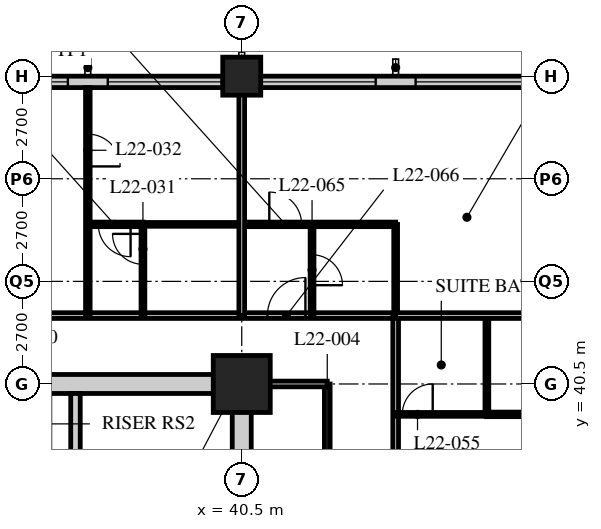
"""IFC4 building model, lengths in metres.
Left out: names, types, materials, properties, quantities, classifications, styles, units other than length and angle.
Written with IfcOpenShell. Run it as: python <this file> out.ifc"""

import sys

from ifc_helpers import new_model, si_unit, direction, frame, frame_2d, origin, origin_2d, place, context, subcontext, project, spatial, rectangle, hollow_rectangle, extrude, element, fill, save


model = new_model("IFC4")
c1 = context("Model", 3, precision=1e-05, world=origin(), true_north=direction((0.0, 1.0)))
c2 = subcontext(c1, "Body", "Model", "MODEL_VIEW")
j1 = project(units=[si_unit("LENGTHUNIT", "METRE"), si_unit("PLANEANGLEUNIT", "RADIAN")], contexts=[c1])
p1 = place(None, origin())
s1 = spatial("IfcSite", under=j1, at=p1, CompositionType="ELEMENT")
p2 = place(p1, origin())
s2 = spatial("IfcBuilding", under=s1, at=p2, CompositionType="ELEMENT")
p3 = place(p2, frame((0.0, 0.0, 87.4)))
s3 = spatial("IfcBuildingStorey", under=s2, at=p3, CompositionType="ELEMENT", Elevation=87.4)
p4 = place(p3, frame((40.5, 40.5, 0.0), z_axis=(0.0, 0.0, 1.0), x_axis=(1.0, 0.0, 0.0)))
e1 = element("IfcColumn", 1, at=p4, inside=s3, PredefinedType="COLUMN", context=c2, shape_type="SweptSolid", body=[
    extrude(hollow_rectangle(XDim=1.5, YDim=1.5, WallThickness=0.13, at=origin_2d()), origin(), (0.0, 0.0, 1.0), 3.4),
])
p5 = place(p3, frame((40.5, 48.6, 0.0), z_axis=(0.0, 0.0, 1.0), x_axis=(1.0, 0.0, 0.0)))
e2 = element("IfcColumn", 2, at=p5, inside=s3, PredefinedType="COLUMN", context=c2, shape_type="SweptSolid", body=[
    extrude(hollow_rectangle(XDim=1.0, YDim=1.0, WallThickness=0.1, at=origin_2d()), origin(), (0.0, 0.0, 1.0), 3.4),
])
p6 = place(p3, frame((48.3, 48.45, 0.0), z_axis=(0.0, 0.0, 1.0), x_axis=(-1.0, 0.0, 0.0)))
e3 = element("IfcWall", 3, at=p6, inside=s3, PredefinedType="SOLIDWALL", context=c2, shape_type="SweptSolid", body=[
    extrude(rectangle(XDim=40.2, YDim=0.3, at=frame_2d((20.1, 0.0))), origin(), (0.0, 0.0, 1.0), 2.05),
])
p7 = place(p6, frame((0.225, 0.0, 0.9)))
e4 = element("IfcOpeningElement", 4, at=p7, cuts=e3, PredefinedType="OPENING", context=c2, shape_type="SweptSolid", body=[
    extrude(rectangle(XDim=3.0, YDim=1.1, at=frame_2d((1.5, 0.55))), frame((0.0, 0.16, 0.0), z_axis=(0.0, -1.0, 0.0), x_axis=(1.0, 0.0, 0.0)), (0.0, 0.0, 1.0), 0.32),
])
p8 = place(p6, frame((4.275, 0.0, 0.9)))
e5 = element("IfcOpeningElement", 5, at=p8, cuts=e3, PredefinedType="OPENING", context=c2, shape_type="SweptSolid", body=[
    extrude(rectangle(XDim=3.0, YDim=1.1, at=frame_2d((1.5, 0.55))), frame((0.0, 0.16, 0.0), z_axis=(0.0, -1.0, 0.0), x_axis=(1.0, 0.0, 0.0)), (0.0, 0.0, 1.0), 0.32),
])
p9 = place(p6, frame((8.325, 0.0, 0.9)))
e6 = element("IfcOpeningElement", 6, at=p9, cuts=e3, PredefinedType="OPENING", context=c2, shape_type="SweptSolid", body=[
    extrude(rectangle(XDim=3.0, YDim=1.1, at=frame_2d((1.5, 0.55))), frame((0.0, 0.16, 0.0), z_axis=(0.0, -1.0, 0.0), x_axis=(1.0, 0.0, 0.0)), (0.0, 0.0, 1.0), 0.32),
])
p10 = place(p6, frame((12.375, 0.0, 0.9)))
e7 = element("IfcOpeningElement", 7, at=p10, cuts=e3, PredefinedType="OPENING", context=c2, shape_type="SweptSolid", body=[
    extrude(rectangle(XDim=3.0, YDim=1.1, at=frame_2d((1.5, 0.55))), frame((0.0, 0.16, 0.0), z_axis=(0.0, -1.0, 0.0), x_axis=(1.0, 0.0, 0.0)), (0.0, 0.0, 1.0), 0.32),
])
p11 = place(p6, frame((16.425, 0.0, 0.9)))
e8 = element("IfcOpeningElement", 8, at=p11, cuts=e3, PredefinedType="OPENING", context=c2, shape_type="SweptSolid", body=[
    extrude(rectangle(XDim=3.0, YDim=1.1, at=frame_2d((1.5, 0.55))), frame((0.0, 0.16, 0.0), z_axis=(0.0, -1.0, 0.0), x_axis=(1.0, 0.0, 0.0)), (0.0, 0.0, 1.0), 0.32),
])
p12 = place(p6, frame((20.475, 0.0, 0.9)))
e9 = element("IfcOpeningElement", 9, at=p12, cuts=e3, PredefinedType="OPENING", context=c2, shape_type="SweptSolid", body=[
    extrude(rectangle(XDim=3.0, YDim=1.1, at=frame_2d((1.5, 0.55))), frame((0.0, 0.16, 0.0), z_axis=(0.0, -1.0, 0.0), x_axis=(1.0, 0.0, 0.0)), (0.0, 0.0, 1.0), 0.32),
])
p13 = place(p6, frame((24.525, 0.0, 0.9)))
e10 = element("IfcOpeningElement", 10, at=p13, cuts=e3, PredefinedType="OPENING", context=c2, shape_type="SweptSolid", body=[
    extrude(rectangle(XDim=3.0, YDim=1.1, at=frame_2d((1.5, 0.55))), frame((0.0, 0.16, 0.0), z_axis=(0.0, -1.0, 0.0), x_axis=(1.0, 0.0, 0.0)), (0.0, 0.0, 1.0), 0.32),
])
p14 = place(p6, frame((28.575, 0.0, 0.9)))
e11 = element("IfcOpeningElement", 11, at=p14, cuts=e3, PredefinedType="OPENING", context=c2, shape_type="SweptSolid", body=[
    extrude(rectangle(XDim=3.0, YDim=1.1, at=frame_2d((1.5, 0.55))), frame((0.0, 0.16, 0.0), z_axis=(0.0, -1.0, 0.0), x_axis=(1.0, 0.0, 0.0)), (0.0, 0.0, 1.0), 0.32),
])
p15 = place(p6, frame((32.625, 0.0, 0.9)))
e12 = element("IfcOpeningElement", 12, at=p15, cuts=e3, PredefinedType="OPENING", context=c2, shape_type="SweptSolid", body=[
    extrude(rectangle(XDim=3.0, YDim=1.1, at=frame_2d((1.5, 0.55))), frame((0.0, 0.16, 0.0), z_axis=(0.0, -1.0, 0.0), x_axis=(1.0, 0.0, 0.0)), (0.0, 0.0, 1.0), 0.32),
])
p16 = place(p6, frame((36.675, 0.0, 0.9)))
e13 = element("IfcOpeningElement", 13, at=p16, cuts=e3, PredefinedType="OPENING", context=c2, shape_type="SweptSolid", body=[
    extrude(rectangle(XDim=3.0, YDim=1.1, at=frame_2d((1.5, 0.55))), frame((0.0, 0.16, 0.0), z_axis=(0.0, -1.0, 0.0), x_axis=(1.0, 0.0, 0.0)), (0.0, 0.0, 1.0), 0.32),
])
p17 = place(p3, frame((12.15, 42.3, 0.0), z_axis=(0.0, 0.0, 1.0), x_axis=(1.0, 0.0, 0.0)))
e14 = element("IfcWall", 14, at=p17, inside=s3, PredefinedType="PARTITIONING", context=c2, shape_type="SweptSolid", body=[
    extrude(rectangle(XDim=32.4, YDim=0.15, at=frame_2d((16.2, 0.0))), origin(), (0.0, 0.0, 1.0), 3.15),
])
p18 = place(p17, frame((5.95, 0.0, 0.0)))
e15 = element("IfcOpeningElement", 15, at=p18, cuts=e14, PredefinedType="OPENING", context=c2, shape_type="SweptSolid", body=[
    extrude(rectangle(XDim=1.0, YDim=2.1, at=frame_2d((0.5, 1.05))), frame((0.0, 0.085, 0.0), z_axis=(0.0, -1.0, 0.0), x_axis=(1.0, 0.0, 0.0)), (0.0, 0.0, 1.0), 0.17),
])
p19 = place(p17, frame((14.6, 0.0, 0.0)))
e16 = element("IfcOpeningElement", 16, at=p19, cuts=e14, PredefinedType="OPENING", context=c2, shape_type="SweptSolid", body=[
    extrude(rectangle(XDim=1.0, YDim=2.1, at=frame_2d((0.5, 1.05))), frame((0.0, 0.085, 0.0), z_axis=(0.0, -1.0, 0.0), x_axis=(1.0, 0.0, 0.0)), (0.0, 0.0, 1.0), 0.17),
])
p20 = place(p17, frame((18.65, 0.0, 0.0)))
e17 = element("IfcOpeningElement", 17, at=p20, cuts=e14, PredefinedType="OPENING", context=c2, shape_type="SweptSolid", body=[
    extrude(rectangle(XDim=1.0, YDim=2.1, at=frame_2d((0.5, 1.05))), frame((0.0, 0.085, 0.0), z_axis=(0.0, -1.0, 0.0), x_axis=(1.0, 0.0, 0.0)), (0.0, 0.0, 1.0), 0.17),
])
p21 = place(p17, frame((22.15, 0.0, 0.0)))
e18 = element("IfcOpeningElement", 18, at=p21, cuts=e14, PredefinedType="OPENING", context=c2, shape_type="SweptSolid", body=[
    extrude(rectangle(XDim=1.0, YDim=2.1, at=frame_2d((0.5, 1.05))), frame((0.0, 0.085, 0.0), z_axis=(0.0, -1.0, 0.0), x_axis=(1.0, 0.0, 0.0)), (0.0, 0.0, 1.0), 0.17),
])
p22 = place(p17, frame((29.025, 0.0, 0.0)))
e19 = element("IfcOpeningElement", 19, at=p22, cuts=e14, PredefinedType="OPENING", context=c2, shape_type="SweptSolid", body=[
    extrude(rectangle(XDim=1.0, YDim=2.1, at=frame_2d((0.5, 1.05))), frame((0.0, 0.085, 0.0), z_axis=(0.0, -1.0, 0.0), x_axis=(1.0, 0.0, 0.0)), (0.0, 0.0, 1.0), 0.17),
])
p23 = place(p17, frame((2.375, 0.0, 0.0)))
e20 = element("IfcOpeningElement", 20, at=p23, cuts=e14, PredefinedType="OPENING", context=c2, shape_type="SweptSolid", body=[
    extrude(rectangle(XDim=1.0, YDim=2.1, at=frame_2d((0.5, 1.05))), frame((0.0, 0.085, 0.0), z_axis=(0.0, -1.0, 0.0), x_axis=(1.0, 0.0, 0.0)), (0.0, 0.0, 1.0), 0.17),
])
p24 = place(p3, frame((44.55, 16.2, 0.0), z_axis=(0.0, 0.0, 1.0), x_axis=(0.0, 1.0, 0.0)))
e21 = element("IfcWall", 21, at=p24, inside=s3, PredefinedType="PARTITIONING", context=c2, shape_type="SweptSolid", body=[
    extrude(rectangle(XDim=26.1, YDim=0.15, at=frame_2d((13.05, 0.0))), origin(), (0.0, 0.0, 1.0), 3.15),
])
p25 = place(p24, frame((2.75, 0.0, 0.0)))
e22 = element("IfcOpeningElement", 22, at=p25, cuts=e21, PredefinedType="OPENING", context=c2, shape_type="SweptSolid", body=[
    extrude(rectangle(XDim=1.0, YDim=2.1, at=frame_2d((0.5, 1.05))), frame((0.0, 0.085, 0.0), z_axis=(0.0, -1.0, 0.0), x_axis=(1.0, 0.0, 0.0)), (0.0, 0.0, 1.0), 0.17),
])
p26 = place(p24, frame((6.5, 0.0, 0.0)))
e23 = element("IfcOpeningElement", 23, at=p26, cuts=e21, PredefinedType="OPENING", context=c2, shape_type="SweptSolid", body=[
    extrude(rectangle(XDim=1.0, YDim=2.1, at=frame_2d((0.5, 1.05))), frame((0.0, 0.085, 0.0), z_axis=(0.0, -1.0, 0.0), x_axis=(1.0, 0.0, 0.0)), (0.0, 0.0, 1.0), 0.17),
])
p27 = place(p24, frame((10.0, 0.0, 0.0)))
e24 = element("IfcOpeningElement", 24, at=p27, cuts=e21, PredefinedType="OPENING", context=c2, shape_type="SweptSolid", body=[
    extrude(rectangle(XDim=1.0, YDim=2.1, at=frame_2d((0.5, 1.05))), frame((0.0, 0.085, 0.0), z_axis=(0.0, -1.0, 0.0), x_axis=(1.0, 0.0, 0.0)), (0.0, 0.0, 1.0), 0.17),
])
p28 = place(p24, frame((18.1, 0.0, 0.0)))
e25 = element("IfcOpeningElement", 25, at=p28, cuts=e21, PredefinedType="OPENING", context=c2, shape_type="SweptSolid", body=[
    extrude(rectangle(XDim=1.0, YDim=2.1, at=frame_2d((0.5, 1.05))), frame((0.0, 0.085, 0.0), z_axis=(0.0, -1.0, 0.0), x_axis=(1.0, 0.0, 0.0)), (0.0, 0.0, 1.0), 0.17),
])
p29 = place(p3, frame((42.75, 18.0, 0.0), z_axis=(0.0, 0.0, 1.0), x_axis=(0.0, 1.0, 0.0)))
e26 = element("IfcWall", 26, at=p29, inside=s3, PredefinedType="PARTITIONING", context=c2, shape_type="SweptSolid", body=[
    extrude(rectangle(XDim=22.5, YDim=0.15, at=frame_2d((11.25, 0.0))), origin(), (0.0, 0.0, 1.0), 3.15),
])
p30 = place(p29, frame((9.85, 0.0, 0.0)))
e27 = element("IfcOpeningElement", 27, at=p30, cuts=e26, PredefinedType="OPENING", context=c2, shape_type="SweptSolid", body=[
    extrude(rectangle(XDim=1.0, YDim=2.1, at=frame_2d((0.5, 1.05))), frame((0.0, 0.085, 0.0), z_axis=(0.0, -1.0, 0.0), x_axis=(1.0, 0.0, 0.0)), (0.0, 0.0, 1.0), 0.17),
])
p31 = place(p29, frame((17.95, 0.0, 0.0)))
e28 = element("IfcOpeningElement", 28, at=p31, cuts=e26, PredefinedType="OPENING", context=c2, shape_type="SweptSolid", body=[
    extrude(rectangle(XDim=1.0, YDim=2.1, at=frame_2d((0.5, 1.05))), frame((0.0, 0.085, 0.0), z_axis=(0.0, -1.0, 0.0), x_axis=(1.0, 0.0, 0.0)), (0.0, 0.0, 1.0), 0.17),
])
p32 = place(p3, frame((42.75, 40.5, 0.0), z_axis=(0.0, 0.0, 1.0), x_axis=(-1.0, 0.0, 0.0)))
e29 = element("IfcWall", 29, at=p32, inside=s3, PredefinedType="PARTITIONING", context=c2, shape_type="SweptSolid", body=[
    extrude(rectangle(XDim=2.05, YDim=0.15, at=frame_2d((1.025, 0.0))), origin(), (0.0, 0.0, 1.0), 2.05),
])
p33 = place(p3, frame((37.9, 44.7, 0.0), z_axis=(0.0, 0.0, 1.0), x_axis=(1.0, 0.0, 0.0)))
e30 = element("IfcWall", 30, at=p33, inside=s3, PredefinedType="PARTITIONING", context=c2, shape_type="SweptSolid", body=[
    extrude(rectangle(XDim=2.6, YDim=0.1, at=frame_2d((1.3, 0.0))), origin(), (0.0, 0.0, 1.0), 3.15),
])
p34 = place(p3, frame((37.9, 42.3, 0.0), z_axis=(0.0, 0.0, 1.0), x_axis=(0.0, 1.0, 0.0)))
e31 = element("IfcWall", 31, at=p34, inside=s3, PredefinedType="PARTITIONING", context=c2, shape_type="SweptSolid", body=[
    extrude(rectangle(XDim=2.4, YDim=0.1, at=frame_2d((1.2, 0.0))), origin(), (0.0, 0.0, 1.0), 3.15),
])
p35 = place(p34, frame((1.35, 0.0, 0.0)))
e32 = element("IfcOpeningElement", 32, at=p35, cuts=e31, PredefinedType="OPENING", context=c2, shape_type="SweptSolid", body=[
    extrude(rectangle(XDim=0.8, YDim=2.1, at=frame_2d((0.4, 1.05))), frame((0.0, 0.06, 0.0), z_axis=(0.0, -1.0, 0.0), x_axis=(1.0, 0.0, 0.0)), (0.0, 0.0, 1.0), 0.12),
])
p36 = place(p3, frame((36.45, 42.3, 0.0), z_axis=(0.0, 0.0, 1.0), x_axis=(0.0, 1.0, 0.0)))
e33 = element("IfcWall", 33, at=p36, inside=s3, PredefinedType="PARTITIONING", context=c2, shape_type="SweptSolid", body=[
    extrude(rectangle(XDim=6.0, YDim=0.12, at=frame_2d((3.0, 0.0))), origin(), (0.0, 0.0, 1.0), 3.15),
])
p37 = place(p36, frame((3.925, 0.0, 0.0)))
e34 = element("IfcOpeningElement", 34, at=p37, cuts=e33, PredefinedType="OPENING", context=c2, shape_type="SweptSolid", body=[
    extrude(rectangle(XDim=0.85, YDim=2.1, at=frame_2d((0.425, 1.05))), frame((0.0, 0.07, 0.0), z_axis=(0.0, -1.0, 0.0), x_axis=(1.0, 0.0, 0.0)), (0.0, 0.0, 1.0), 0.14),
])
p38 = place(p3, frame((46.95, 39.7, 0.0), z_axis=(0.0, 0.0, 1.0), x_axis=(0.0, 1.0, 0.0)))
e35 = element("IfcWall", 35, at=p38, inside=s3, PredefinedType="PARTITIONING", context=c2, shape_type="SweptSolid", body=[
    extrude(rectangle(XDim=2.6, YDim=0.1, at=frame_2d((1.3, 0.0))), origin(), (0.0, 0.0, 1.0), 3.15),
])
p39 = place(p3, frame((44.55, 39.7, 0.0), z_axis=(0.0, 0.0, 1.0), x_axis=(1.0, 0.0, 0.0)))
e36 = element("IfcWall", 36, at=p39, inside=s3, PredefinedType="PARTITIONING", context=c2, shape_type="SweptSolid", body=[
    extrude(rectangle(XDim=2.4, YDim=0.1, at=frame_2d((1.2, 0.0))), origin(), (0.0, 0.0, 1.0), 3.15),
])
p40 = place(p39, frame((0.175, 0.0, 0.0)))
e37 = element("IfcOpeningElement", 37, at=p40, cuts=e36, PredefinedType="OPENING", context=c2, shape_type="SweptSolid", body=[
    extrude(rectangle(XDim=0.8, YDim=2.1, at=frame_2d((0.4, 1.05))), frame((0.0, 0.06, 0.0), z_axis=(0.0, -1.0, 0.0), x_axis=(1.0, 0.0, 0.0)), (0.0, 0.0, 1.0), 0.12),
])
p41 = place(p3, frame((40.5, 44.7, 0.0), z_axis=(0.0, 0.0, 1.0), x_axis=(1.0, 0.0, 0.0)))
e38 = element("IfcWall", 38, at=p41, inside=s3, PredefinedType="PARTITIONING", context=c2, shape_type="SweptSolid", body=[
    extrude(rectangle(XDim=4.05, YDim=0.12, at=frame_2d((2.025, 0.0))), origin(), (0.0, 0.0, 1.0), 3.15),
])
p42 = place(p41, frame((0.725, 0.0, 0.0)))
e39 = element("IfcOpeningElement", 39, at=p42, cuts=e38, PredefinedType="OPENING", context=c2, shape_type="SweptSolid", body=[
    extrude(rectangle(XDim=0.85, YDim=2.1, at=frame_2d((0.425, 1.05))), frame((0.0, 0.07, 0.0), z_axis=(0.0, -1.0, 0.0), x_axis=(1.0, 0.0, 0.0)), (0.0, 0.0, 1.0), 0.14),
])
p43 = place(p3, frame((42.35, 42.3, 0.0), z_axis=(0.0, 0.0, 1.0), x_axis=(0.0, 1.0, 0.0)))
e40 = element("IfcWall", 40, at=p43, inside=s3, PredefinedType="PARTITIONING", context=c2, shape_type="SweptSolid", body=[
    extrude(rectangle(XDim=2.4, YDim=0.1, at=frame_2d((1.2, 0.0))), origin(), (0.0, 0.0, 1.0), 3.15),
])
p44 = place(p43, frame((0.8, 0.0, 0.0)))
e41 = element("IfcOpeningElement", 41, at=p44, cuts=e40, PredefinedType="OPENING", context=c2, shape_type="SweptSolid", body=[
    extrude(rectangle(XDim=0.8, YDim=2.1, at=frame_2d((0.4, 1.05))), frame((0.0, 0.06, 0.0), z_axis=(0.0, -1.0, 0.0), x_axis=(1.0, 0.0, 0.0)), (0.0, 0.0, 1.0), 0.12),
])
p45 = place(p3, frame((44.55, 42.3, 0.0), z_axis=(0.0, 0.0, 1.0), x_axis=(0.0, 1.0, 0.0)))
e42 = element("IfcWall", 42, at=p45, inside=s3, PredefinedType="PARTITIONING", context=c2, shape_type="SweptSolid", body=[
    extrude(rectangle(XDim=2.4, YDim=0.1, at=frame_2d((1.2, 0.0))), origin(), (0.0, 0.0, 1.0), 3.15),
])
p46 = place(p3, frame((44.55, 42.3, 0.0), z_axis=(0.0, 0.0, 1.0), x_axis=(1.0, 0.0, 0.0)))
e43 = element("IfcWall", 43, at=p46, inside=s3, PredefinedType="PARTITIONING", context=c2, shape_type="SweptSolid", body=[
    extrude(rectangle(XDim=7.8, YDim=0.15, at=frame_2d((3.9, 0.0))), origin(), (0.0, 0.0, 1.0), 3.15),
])
p47 = place(p3, frame((40.5, 42.3, 0.0), z_axis=(0.0, 0.0, 1.0), x_axis=(0.0, 1.0, 0.0)))
e44 = element("IfcWall", 44, at=p47, inside=s3, PredefinedType="PARTITIONING", context=c2, shape_type="SweptSolid", body=[
    extrude(rectangle(XDim=6.0, YDim=0.15, at=frame_2d((3.0, 0.0))), origin(), (0.0, 0.0, 1.0), 2.05),
])
p48 = place(p3, frame((36.45, 44.7, 0.0), z_axis=(0.0, 0.0, 1.0), x_axis=(1.0, 0.0, 0.0)))
e45 = element("IfcWall", 45, at=p48, inside=s3, PredefinedType="PARTITIONING", context=c2, shape_type="SweptSolid", body=[
    extrude(rectangle(XDim=1.46, YDim=0.12, at=frame_2d((0.73, 0.0))), origin(), (0.0, 0.0, 1.0), 3.15),
])
p49 = place(p48, frame((0.275, 0.0, 0.0)))
e46 = element("IfcOpeningElement", 46, at=p49, cuts=e45, PredefinedType="OPENING", context=c2, shape_type="SweptSolid", body=[
    extrude(rectangle(XDim=0.85, YDim=2.1, at=frame_2d((0.425, 1.05))), frame((0.0, 0.07, 0.0), z_axis=(0.0, -1.0, 0.0), x_axis=(1.0, 0.0, 0.0)), (0.0, 0.0, 1.0), 0.14),
])
p50 = place(p3, frame((56.4, 39.7, 0.0), z_axis=(0.0, 0.0, 1.0), x_axis=(-1.0, 0.0, 0.0)))
e47 = element("IfcWall", 47, at=p50, inside=s3, PredefinedType="PARTITIONING", context=c2, shape_type="SweptSolid", body=[
    extrude(rectangle(XDim=9.46, YDim=0.12, at=frame_2d((4.73, 0.0))), origin(), (0.0, 0.0, 1.0), 3.15),
])
p51 = place(p50, frame((6.085, 0.0, 0.0)))
e48 = element("IfcOpeningElement", 48, at=p51, cuts=e47, PredefinedType="OPENING", context=c2, shape_type="SweptSolid", body=[
    extrude(rectangle(XDim=0.85, YDim=2.0, at=frame_2d((0.425, 1.0))), frame((0.0, 0.07, 0.0), z_axis=(0.0, -1.0, 0.0), x_axis=(1.0, 0.0, 0.0)), (0.0, 0.0, 1.0), 0.14),
])
p52 = place(p3, frame((32.4, 40.5, 0.0), z_axis=(0.0, 0.0, 1.0), x_axis=(1.0, 0.0, 0.0)))
e49 = element("IfcWall", 49, at=p52, inside=s3, PredefinedType="SOLIDWALL", context=c2, shape_type="SweptSolid", body=[
    extrude(rectangle(XDim=8.35, YDim=0.5, at=frame_2d((4.175, 0.0))), origin(), (0.0, 0.0, 1.0), 2.388),
])
p53 = place(p3, frame((40.5, 24.55, 0.0), z_axis=(0.0, 0.0, 1.0), x_axis=(0.0, 1.0, 0.0)))
e50 = element("IfcWall", 50, at=p53, inside=s3, PredefinedType="SOLIDWALL", context=c2, shape_type="SweptSolid", body=[
    extrude(rectangle(XDim=15.7, YDim=0.5, at=frame_2d((7.85, 0.0))), origin(), (0.0, 0.0, 1.0), 2.05),
])
p54 = place(p3, frame((36.125, 32.5, 0.0), z_axis=(0.0, 0.0, 1.0), x_axis=(0.0, 1.0, 0.0)))
e51 = element("IfcWall", 51, at=p54, inside=s3, PredefinedType="SOLIDWALL", context=c2, shape_type="SweptSolid", body=[
    extrude(rectangle(XDim=7.75, YDim=0.25, at=frame_2d((3.875, 0.0))), origin(), (0.0, 0.0, 1.0), 3.15),
])
p55 = place(p54, frame((0.45, 0.0, 0.0)))
e52 = element("IfcOpeningElement", 52, at=p55, cuts=e51, PredefinedType="OPENING", context=c2, shape_type="SweptSolid", body=[
    extrude(rectangle(XDim=1.2, YDim=2.1, at=frame_2d((0.6, 1.05))), frame((0.0, 0.135, 0.0), z_axis=(0.0, -1.0, 0.0), x_axis=(1.0, 0.0, 0.0)), (0.0, 0.0, 1.0), 0.27),
])
p56 = place(p7, origin())
e53 = element("IfcWindow", 53, at=p56, inside=s3, PartitioningType="SINGLE_PANEL", PredefinedType="WINDOW", context=c2, shape_type="SweptSolid", body=[
    extrude(rectangle(XDim=3.0, YDim=1.1, at=frame_2d((1.5, 0.55))), frame((0.0, 0.03, 0.0), z_axis=(0.0, -1.0, 0.0), x_axis=(1.0, 0.0, 0.0)), (0.0, 0.0, 1.0), 0.06),
])
fill(e4, e53)
p57 = place(p8, origin())
e54 = element("IfcWindow", 54, at=p57, inside=s3, PartitioningType="SINGLE_PANEL", PredefinedType="WINDOW", context=c2, shape_type="SweptSolid", body=[
    extrude(rectangle(XDim=3.0, YDim=1.1, at=frame_2d((1.5, 0.55))), frame((0.0, 0.03, 0.0), z_axis=(0.0, -1.0, 0.0), x_axis=(1.0, 0.0, 0.0)), (0.0, 0.0, 1.0), 0.06),
])
fill(e5, e54)
p58 = place(p9, origin())
e55 = element("IfcWindow", 55, at=p58, inside=s3, PartitioningType="SINGLE_PANEL", PredefinedType="WINDOW", context=c2, shape_type="SweptSolid", body=[
    extrude(rectangle(XDim=3.0, YDim=1.1, at=frame_2d((1.5, 0.55))), frame((0.0, 0.03, 0.0), z_axis=(0.0, -1.0, 0.0), x_axis=(1.0, 0.0, 0.0)), (0.0, 0.0, 1.0), 0.06),
])
fill(e6, e55)
p59 = place(p10, origin())
e56 = element("IfcWindow", 56, at=p59, inside=s3, PartitioningType="SINGLE_PANEL", PredefinedType="WINDOW", context=c2, shape_type="SweptSolid", body=[
    extrude(rectangle(XDim=3.0, YDim=1.1, at=frame_2d((1.5, 0.55))), frame((0.0, 0.03, 0.0), z_axis=(0.0, -1.0, 0.0), x_axis=(1.0, 0.0, 0.0)), (0.0, 0.0, 1.0), 0.06),
])
fill(e7, e56)
p60 = place(p35, origin())
e57 = element("IfcDoor", 57, at=p60, inside=s3, OperationType="SINGLE_SWING_RIGHT", PredefinedType="DOOR", context=c2, shape_type="SweptSolid", body=[
    extrude(rectangle(XDim=0.8, YDim=2.1, at=frame_2d((0.4, 1.05))), frame((0.0, 0.025, 0.0), z_axis=(0.0, -1.0, 0.0), x_axis=(1.0, 0.0, 0.0)), (0.0, 0.0, 1.0), 0.05),
])
fill(e32, e57)
p61 = place(p37, origin())
e58 = element("IfcDoor", 58, at=p61, inside=s3, OperationType="SINGLE_SWING_RIGHT", PredefinedType="DOOR", context=c2, shape_type="SweptSolid", body=[
    extrude(rectangle(XDim=0.85, YDim=2.1, at=frame_2d((0.425, 1.05))), frame((0.0, 0.025, 0.0), z_axis=(0.0, -1.0, 0.0), x_axis=(1.0, 0.0, 0.0)), (0.0, 0.0, 1.0), 0.05),
])
fill(e34, e58)
p62 = place(p40, origin())
e59 = element("IfcDoor", 59, at=p62, inside=s3, OperationType="SINGLE_SWING_RIGHT", PredefinedType="DOOR", context=c2, shape_type="SweptSolid", body=[
    extrude(rectangle(XDim=0.8, YDim=2.1, at=frame_2d((0.4, 1.05))), frame((0.0, 0.025, 0.0), z_axis=(0.0, -1.0, 0.0), x_axis=(1.0, 0.0, 0.0)), (0.0, 0.0, 1.0), 0.05),
])
fill(e37, e59)
p63 = place(p44, origin())
e60 = element("IfcDoor", 60, at=p63, inside=s3, OperationType="SINGLE_SWING_RIGHT", PredefinedType="DOOR", context=c2, shape_type="SweptSolid", body=[
    extrude(rectangle(XDim=0.8, YDim=2.1, at=frame_2d((0.4, 1.05))), frame((0.0, 0.025, 0.0), z_axis=(0.0, -1.0, 0.0), x_axis=(1.0, 0.0, 0.0)), (0.0, 0.0, 1.0), 0.05),
])
fill(e41, e60)
p64 = place(p22, origin())
e61 = element("IfcDoor", 61, at=p64, inside=s3, OperationType="SINGLE_SWING_RIGHT", PredefinedType="DOOR", context=c2, shape_type="SweptSolid", body=[
    extrude(rectangle(XDim=1.0, YDim=2.1, at=frame_2d((0.5, 1.05))), frame((0.0, 0.025, 0.0), z_axis=(0.0, -1.0, 0.0), x_axis=(1.0, 0.0, 0.0)), (0.0, 0.0, 1.0), 0.05),
])
fill(e19, e61)
p65 = place(p42, origin())
e62 = element("IfcDoor", 62, at=p65, inside=s3, OperationType="SINGLE_SWING_LEFT", PredefinedType="DOOR", context=c2, shape_type="SweptSolid", body=[
    extrude(rectangle(XDim=0.85, YDim=2.1, at=frame_2d((0.425, 1.05))), frame((0.0, 0.025, 0.0), z_axis=(0.0, -1.0, 0.0), x_axis=(1.0, 0.0, 0.0)), (0.0, 0.0, 1.0), 0.05),
])
fill(e39, e62)
p66 = place(p49, origin())
e63 = element("IfcDoor", 63, at=p66, inside=s3, OperationType="SINGLE_SWING_LEFT", PredefinedType="DOOR", context=c2, shape_type="SweptSolid", body=[
    extrude(rectangle(XDim=0.85, YDim=2.1, at=frame_2d((0.425, 1.05))), frame((0.0, 0.025, 0.0), z_axis=(0.0, -1.0, 0.0), x_axis=(1.0, 0.0, 0.0)), (0.0, 0.0, 1.0), 0.05),
])
fill(e46, e63)
save(model, sys.argv[1])
